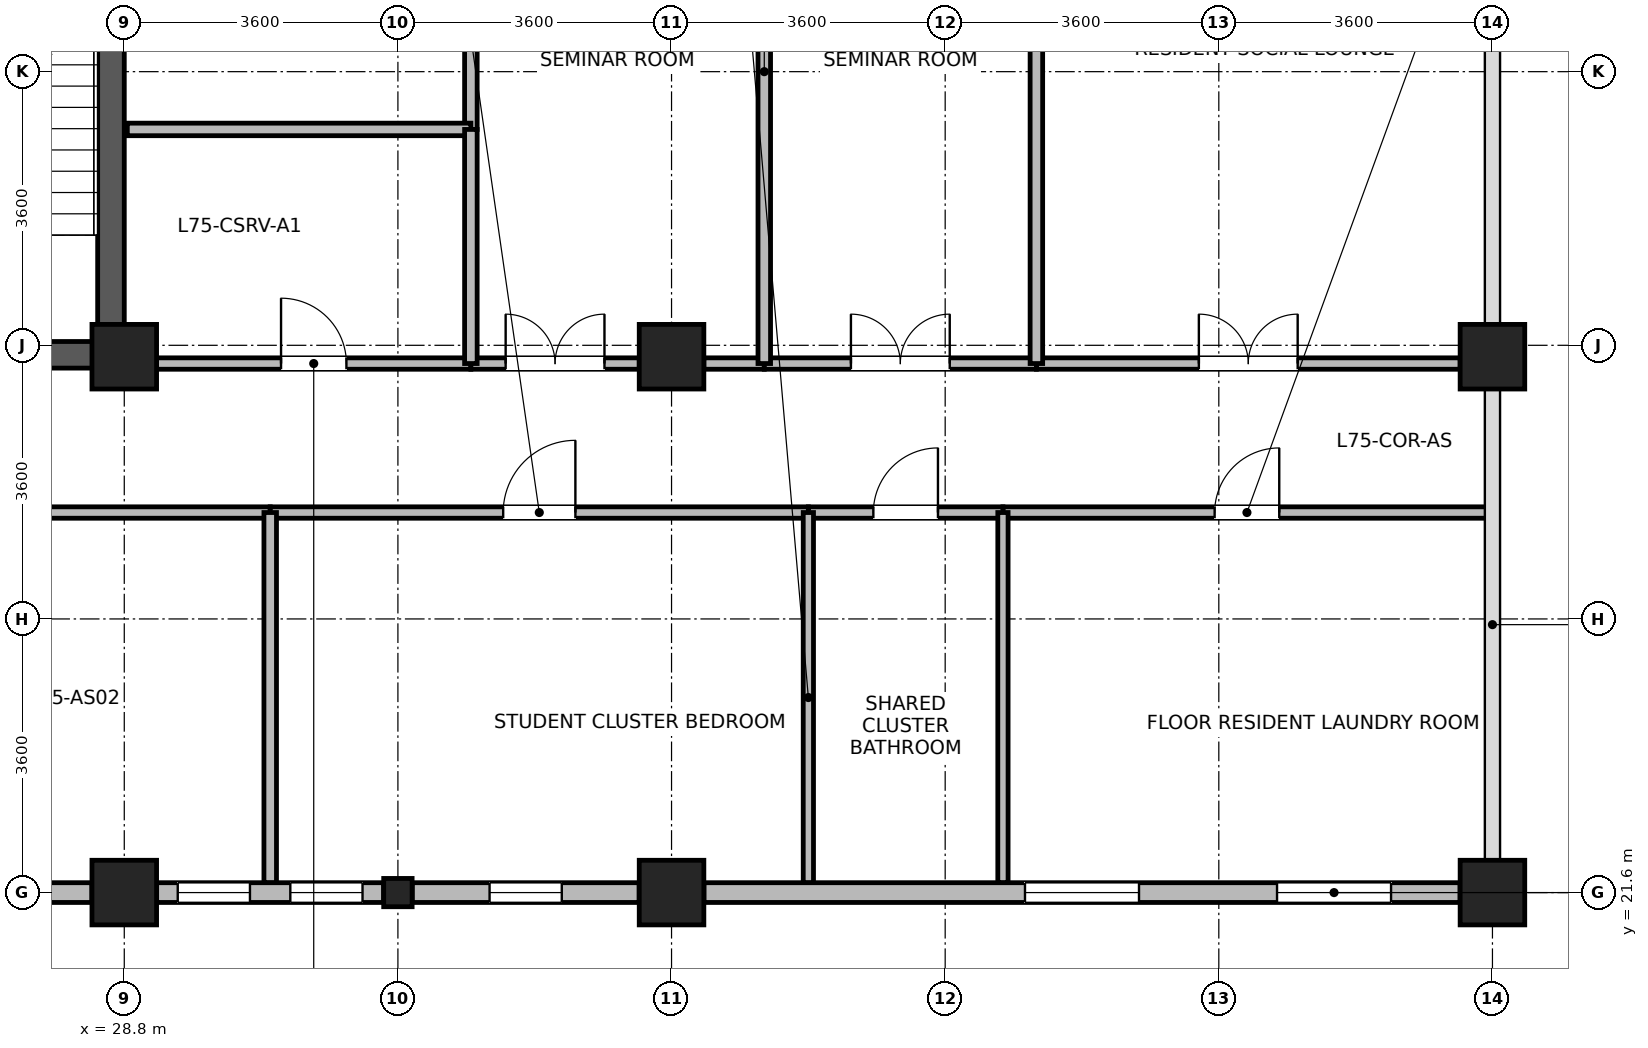
"""IFC4 building model, lengths in metres.
Left out: names, types, materials, properties, quantities, classifications, styles, units other than length and angle.
Written with IfcOpenShell. Run it as: python <this file> out.ifc"""

import sys

from ifc_helpers import new_model, si_unit, direction, frame, frame_2d, origin, origin_2d, place, context, subcontext, project, spatial, rectangle, i_section, extrude, source, transform, mapped, element, fill, save


model = new_model("IFC4")
c1 = context("Model", 3, precision=1e-05, world=origin(), true_north=direction((0.0, 1.0)))
c2 = subcontext(c1, "Body", "Model", "MODEL_VIEW")
j1 = project(units=[si_unit("LENGTHUNIT", "METRE"), si_unit("PLANEANGLEUNIT", "RADIAN")], contexts=[c1])
p1 = place(None, origin())
s1 = spatial("IfcSite", under=j1, at=p1, CompositionType="ELEMENT")
p2 = place(p1, origin())
s2 = spatial("IfcBuilding", under=s1, at=p2, CompositionType="ELEMENT")
p3 = place(p2, frame((0.0, 0.0, 290.6)))
s3 = spatial("IfcBuildingStorey", under=s2, at=p3, CompositionType="ELEMENT", Elevation=290.6)
p4 = place(p3, frame((28.625, 28.5, 0.0), z_axis=(0.0, 0.0, 1.0), x_axis=(0.0, 1.0, 0.0)))
e1 = element("IfcWall", 1, at=p4, inside=s3, PredefinedType="SHEAR", context=c2, shape_type="SweptSolid", body=[
    extrude(rectangle(XDim=7.7, YDim=0.35, at=frame_2d((3.85, 0.0))), origin(), (0.0, 0.0, 1.0), 3.475),
])
p5 = place(p3, frame((25.25, 28.675, 0.0), z_axis=(0.0, 0.0, 1.0), x_axis=(1.0, 0.0, 0.0)))
e2 = element("IfcWall", 2, at=p5, inside=s3, PredefinedType="SHEAR", context=c2, shape_type="SweptSolid", body=[
    extrude(rectangle(XDim=3.2, YDim=0.35, at=frame_2d((1.6, 0.0))), origin(), (0.0, 0.0, 1.0), 3.475),
])
m1 = source(origin(), c2, "Body", "SweptSolid", [
    extrude(rectangle(XDim=0.85, YDim=0.85, at=origin_2d()), origin(), (0.0, 0.0, 1.0), 3.7),
])
for number, where, z_axis, x_axis in (
    (3, (28.8, 21.6, 0.0), (0.0, 0.0, 1.0), (1.0, 0.0, 0.0)),
    (4, (28.8, 28.65, 0.0), (0.0, 0.0, 1.0), (1.0, 0.0, 0.0)),
    (5, (36.0, 21.6, 0.0), (0.0, 0.0, 1.0), (1.0, 0.0, 0.0)),
    (6, (36.0, 28.65, 0.0), (0.0, 0.0, 1.0), (1.0, 0.0, 0.0)),
    (7, (46.8, 21.6, 0.0), (0.0, 0.0, 1.0), (1.0, 0.0, 0.0)),
    (8, (46.8, 28.65, 0.0), (0.0, 0.0, 1.0), (1.0, 0.0, 0.0)),
):
    element("IfcColumn", number, at=place(p3, frame(where, z_axis=z_axis, x_axis=x_axis)), inside=s3, PredefinedType="COLUMN", context=c2, shape_type="MappedRepresentation", body=[
        mapped(m1, transform((0.0, 0.0, 0.0), x_axis=(1.0, 0.0, 0.0), y_axis=(0.0, 1.0, 0.0), z_axis=(0.0, 0.0, 1.0), scale=1.0)),
    ])
m2 = source(origin(), c2, "Body", "SweptSolid", [
    extrude(i_section(OverallWidth=0.374, OverallDepth=0.372, WebThickness=0.015, FlangeThickness=0.026, FilletRadius=0.015, at=origin_2d()), origin(), (0.0, 0.0, 1.0), 3.7),
])
p6 = place(p3, frame((32.4, 21.6, 0.0), z_axis=(0.0, 0.0, 1.0), x_axis=(1.0, 0.0, 0.0)))
e9 = element("IfcColumn", 9, at=p6, inside=s3, PredefinedType="COLUMN", context=c2, shape_type="MappedRepresentation", body=[
    mapped(m2, transform((0.0, 0.0, 0.0), x_axis=(1.0, 0.0, 0.0), y_axis=(0.0, 1.0, 0.0), z_axis=(0.0, 0.0, 1.0), scale=1.0)),
])
p7 = place(p3, frame((28.374, 21.6, 0.0), z_axis=(0.0, 0.0, 1.0), x_axis=(-1.0, 0.0, 0.0)))
e10 = element("IfcWall", 10, at=p7, inside=s3, PredefinedType="STANDARD", context=c2, shape_type="SweptSolid", body=[
    extrude(rectangle(XDim=2.986, YDim=0.26, at=frame_2d((1.493, 0.0))), origin(), (0.0, 0.0, 1.0), 3.055),
])
p8 = place(p7, frame((1.018, 0.0, 0.85)))
e11 = element("IfcOpeningElement", 11, at=p8, cuts=e10, PredefinedType="OPENING", context=c2, shape_type="SweptSolid", body=[
    extrude(rectangle(XDim=0.95, YDim=1.75, at=frame_2d((0.475, 0.875))), frame((0.0, 0.14, 0.0), z_axis=(0.0, -1.0, 0.0), x_axis=(1.0, 0.0, 0.0)), (0.0, 0.0, 1.0), 0.28),
])
p9 = place(p3, frame((32.212, 21.6, 0.0), z_axis=(0.0, 0.0, 1.0), x_axis=(-1.0, 0.0, 0.0)))
e12 = element("IfcWall", 12, at=p9, inside=s3, PredefinedType="STANDARD", context=c2, shape_type="SweptSolid", body=[
    extrude(rectangle(XDim=2.986, YDim=0.26, at=frame_2d((1.493, 0.0))), origin(), (0.0, 0.0, 1.0), 3.055),
])
p10 = place(p9, frame((0.278, 0.0, 0.85)))
e13 = element("IfcOpeningElement", 13, at=p10, cuts=e12, PredefinedType="OPENING", context=c2, shape_type="SweptSolid", body=[
    extrude(rectangle(XDim=0.95, YDim=1.75, at=frame_2d((0.475, 0.875))), frame((0.0, 0.14, 0.0), z_axis=(0.0, -1.0, 0.0), x_axis=(1.0, 0.0, 0.0)), (0.0, 0.0, 1.0), 0.28),
])
p11 = place(p9, frame((1.759, 0.0, 0.85)))
e14 = element("IfcOpeningElement", 14, at=p11, cuts=e12, PredefinedType="OPENING", context=c2, shape_type="SweptSolid", body=[
    extrude(rectangle(XDim=0.95, YDim=1.75, at=frame_2d((0.475, 0.875))), frame((0.0, 0.14, 0.0), z_axis=(0.0, -1.0, 0.0), x_axis=(1.0, 0.0, 0.0)), (0.0, 0.0, 1.0), 0.28),
])
p12 = place(p3, frame((35.574, 21.6, 0.0), z_axis=(0.0, 0.0, 1.0), x_axis=(-1.0, 0.0, 0.0)))
e15 = element("IfcWall", 15, at=p12, inside=s3, PredefinedType="STANDARD", context=c2, shape_type="SweptSolid", body=[
    extrude(rectangle(XDim=2.986, YDim=0.26, at=frame_2d((1.493, 0.0))), origin(), (0.0, 0.0, 1.0), 3.055),
])
p13 = place(p12, frame((1.018, 0.0, 0.85)))
e16 = element("IfcOpeningElement", 16, at=p13, cuts=e15, PredefinedType="OPENING", context=c2, shape_type="SweptSolid", body=[
    extrude(rectangle(XDim=0.95, YDim=1.75, at=frame_2d((0.475, 0.875))), frame((0.0, 0.14, 0.0), z_axis=(0.0, -1.0, 0.0), x_axis=(1.0, 0.0, 0.0)), (0.0, 0.0, 1.0), 0.28),
])
p14 = place(p3, frame((46.374, 21.6, 0.0), z_axis=(0.0, 0.0, 1.0), x_axis=(-1.0, 0.0, 0.0)))
e17 = element("IfcWall", 17, at=p14, inside=s3, PredefinedType="STANDARD", context=c2, shape_type="SweptSolid", body=[
    extrude(rectangle(XDim=9.948, YDim=0.26, at=frame_2d((4.974, 0.0))), origin(), (0.0, 0.0, 1.0), 3.055),
])
p15 = place(p14, frame((0.908, 0.0, 0.85)))
e18 = element("IfcOpeningElement", 18, at=p15, cuts=e17, PredefinedType="OPENING", context=c2, shape_type="SweptSolid", body=[
    extrude(rectangle(XDim=1.5, YDim=1.85, at=frame_2d((0.75, 0.925))), frame((0.0, 0.14, 0.0), z_axis=(0.0, -1.0, 0.0), x_axis=(1.0, 0.0, 0.0)), (0.0, 0.0, 1.0), 0.28),
])
p16 = place(p14, frame((4.224, 0.0, 0.85)))
e19 = element("IfcOpeningElement", 19, at=p16, cuts=e17, PredefinedType="OPENING", context=c2, shape_type="SweptSolid", body=[
    extrude(rectangle(XDim=1.5, YDim=1.85, at=frame_2d((0.75, 0.925))), frame((0.0, 0.14, 0.0), z_axis=(0.0, -1.0, 0.0), x_axis=(1.0, 0.0, 0.0)), (0.0, 0.0, 1.0), 0.28),
])
p17 = place(p3, frame((17.78, 26.6, 0.0), z_axis=(0.0, 0.0, 1.0), x_axis=(1.0, 0.0, 0.0)))
e20 = element("IfcWall", 20, at=p17, inside=s3, PredefinedType="PARTITIONING", context=c2, shape_type="SweptSolid", body=[
    extrude(rectangle(XDim=12.94, YDim=0.15, at=frame_2d((6.47, 0.0))), origin(), (0.0, 0.0, 1.0), 3.455),
])
p18 = place(p17, frame((6.02, 0.0, 0.0)))
e21 = element("IfcOpeningElement", 21, at=p18, cuts=e20, PredefinedType="OPENING", context=c2, shape_type="SweptSolid", body=[
    extrude(rectangle(XDim=0.9, YDim=2.08, at=frame_2d((0.45, 1.04))), frame((0.0, 0.085, 0.0), z_axis=(0.0, -1.0, 0.0), x_axis=(1.0, 0.0, 0.0)), (0.0, 0.0, 1.0), 0.17),
])
p19 = place(p3, frame((30.72, 26.6, 0.0), z_axis=(0.0, 0.0, 1.0), x_axis=(1.0, 0.0, 0.0)))
e22 = element("IfcWall", 22, at=p19, inside=s3, PredefinedType="PARTITIONING", context=c2, shape_type="SweptSolid", body=[
    extrude(rectangle(XDim=7.08, YDim=0.15, at=frame_2d((3.54, 0.0))), origin(), (0.0, 0.0, 1.0), 3.455),
])
p20 = place(p19, frame((3.065, 0.0, 0.0)))
e23 = element("IfcOpeningElement", 23, at=p20, cuts=e22, PredefinedType="OPENING", context=c2, shape_type="SweptSolid", body=[
    extrude(rectangle(XDim=0.95, YDim=2.1, at=frame_2d((0.475, 1.05))), frame((0.0, 0.085, 0.0), z_axis=(0.0, -1.0, 0.0), x_axis=(1.0, 0.0, 0.0)), (0.0, 0.0, 1.0), 0.17),
])
p21 = place(p3, frame((40.36, 26.6, 0.0), z_axis=(0.0, 0.0, 1.0), x_axis=(1.0, 0.0, 0.0)))
e24 = element("IfcWall", 24, at=p21, inside=s3, PredefinedType="PARTITIONING", context=c2, shape_type="SweptSolid", body=[
    extrude(rectangle(XDim=6.42, YDim=0.15, at=frame_2d((3.21, 0.0))), origin(), (0.0, 0.0, 1.0), 3.455),
])
p22 = place(p21, frame((2.785, 0.0, 0.0)))
e25 = element("IfcOpeningElement", 25, at=p22, cuts=e24, PredefinedType="OPENING", context=c2, shape_type="SweptSolid", body=[
    extrude(rectangle(XDim=0.85, YDim=2.04, at=frame_2d((0.425, 1.02))), frame((0.0, 0.085, 0.0), z_axis=(0.0, -1.0, 0.0), x_axis=(1.0, 0.0, 0.0)), (0.0, 0.0, 1.0), 0.17),
])
p23 = place(p3, frame((40.8, 28.56, 0.0), z_axis=(0.0, 0.0, 1.0), x_axis=(1.0, 0.0, 0.0)))
e26 = element("IfcWall", 26, at=p23, inside=s3, PredefinedType="PARTITIONING", context=c2, shape_type="SweptSolid", body=[
    extrude(rectangle(XDim=5.575, YDim=0.15, at=frame_2d((2.788, 0.0))), origin(), (0.0, 0.0, 1.0), 2.905),
])
p24 = place(p23, frame((2.137, 0.0, 0.0)))
e27 = element("IfcOpeningElement", 27, at=p24, cuts=e26, PredefinedType="OPENING", context=c2, shape_type="SweptSolid", body=[
    extrude(rectangle(XDim=1.3, YDim=2.12, at=frame_2d((0.65, 1.06))), frame((0.0, 0.085, 0.0), z_axis=(0.0, -1.0, 0.0), x_axis=(1.0, 0.0, 0.0)), (0.0, 0.0, 1.0), 0.17),
])
p25 = place(p3, frame((29.225, 28.56, 0.0), z_axis=(0.0, 0.0, 1.0), x_axis=(1.0, 0.0, 0.0)))
e28 = element("IfcWall", 28, at=p25, inside=s3, PredefinedType="PARTITIONING", context=c2, shape_type="SweptSolid", body=[
    extrude(rectangle(XDim=4.135, YDim=0.15, at=frame_2d((2.067, 0.0))), origin(), (0.0, 0.0, 1.0), 2.905),
])
p26 = place(p25, frame((1.637, 0.0, 0.0)))
e29 = element("IfcOpeningElement", 29, at=p26, cuts=e28, PredefinedType="OPENING", context=c2, shape_type="SweptSolid", body=[
    extrude(rectangle(XDim=0.86, YDim=2.02, at=frame_2d((0.43, 1.01))), frame((0.0, 0.085, 0.0), z_axis=(0.0, -1.0, 0.0), x_axis=(1.0, 0.0, 0.0)), (0.0, 0.0, 1.0), 0.17),
])
p27 = place(p3, frame((33.36, 28.56, 0.0), z_axis=(0.0, 0.0, 1.0), x_axis=(1.0, 0.0, 0.0)))
e30 = element("IfcWall", 30, at=p27, inside=s3, PredefinedType="PARTITIONING", context=c2, shape_type="SweptSolid", body=[
    extrude(rectangle(XDim=2.215, YDim=0.15, at=frame_2d((1.107, 0.0))), origin(), (0.0, 0.0, 1.0), 2.905),
])
p28 = place(p27, frame((0.458, 0.0, 0.0)))
e31 = element("IfcOpeningElement", 31, at=p28, cuts=e30, PredefinedType="OPENING", context=c2, shape_type="SweptSolid", body=[
    extrude(rectangle(XDim=1.3, YDim=2.12, at=frame_2d((0.65, 1.06))), frame((0.0, 0.085, 0.0), z_axis=(0.0, -1.0, 0.0), x_axis=(1.0, 0.0, 0.0)), (0.0, 0.0, 1.0), 0.17),
])
p29 = place(p3, frame((36.425, 28.56, 0.0), z_axis=(0.0, 0.0, 1.0), x_axis=(1.0, 0.0, 0.0)))
e32 = element("IfcWall", 32, at=p29, inside=s3, PredefinedType="PARTITIONING", context=c2, shape_type="SweptSolid", body=[
    extrude(rectangle(XDim=0.795, YDim=0.15, at=frame_2d((0.397, 0.0))), origin(), (0.0, 0.0, 1.0), 2.905),
])
p30 = place(p3, frame((37.22, 28.56, 0.0), z_axis=(0.0, 0.0, 1.0), x_axis=(1.0, 0.0, 0.0)))
e33 = element("IfcWall", 33, at=p30, inside=s3, PredefinedType="PARTITIONING", context=c2, shape_type="SweptSolid", body=[
    extrude(rectangle(XDim=3.58, YDim=0.15, at=frame_2d((1.79, 0.0))), origin(), (0.0, 0.0, 1.0), 2.905),
])
p31 = place(p30, frame((1.14, 0.0, 0.0)))
e34 = element("IfcOpeningElement", 34, at=p31, cuts=e33, PredefinedType="OPENING", context=c2, shape_type="SweptSolid", body=[
    extrude(rectangle(XDim=1.3, YDim=2.12, at=frame_2d((0.65, 1.06))), frame((0.0, 0.085, 0.0), z_axis=(0.0, -1.0, 0.0), x_axis=(1.0, 0.0, 0.0)), (0.0, 0.0, 1.0), 0.17),
])
p32 = place(p3, frame((37.8, 26.6, 0.0), z_axis=(0.0, 0.0, 1.0), x_axis=(1.0, 0.0, 0.0)))
e35 = element("IfcWall", 35, at=p32, inside=s3, PredefinedType="PARTITIONING", context=c2, shape_type="SweptSolid", body=[
    extrude(rectangle(XDim=2.56, YDim=0.15, at=frame_2d((1.28, 0.0))), origin(), (0.0, 0.0, 1.0), 3.455),
])
p33 = place(p32, frame((0.855, 0.0, 0.0)))
e36 = element("IfcOpeningElement", 36, at=p33, cuts=e35, PredefinedType="OPENING", context=c2, shape_type="SweptSolid", body=[
    extrude(rectangle(XDim=0.85, YDim=2.04, at=frame_2d((0.425, 1.02))), frame((0.0, 0.085, 0.0), z_axis=(0.0, -1.0, 0.0), x_axis=(1.0, 0.0, 0.0)), (0.0, 0.0, 1.0), 0.17),
])
for number, where, z_axis, x_axis in (
    (37, (37.22, 28.56, 0.0), (0.0, 0.0, 1.0), (0.0, 1.0, 0.0)),
    (38, (40.8, 28.56, 0.0), (0.0, 0.0, 1.0), (0.0, 1.0, 0.0)),
):
    element("IfcWall", number, at=place(p3, frame(where, z_axis=z_axis, x_axis=x_axis)), inside=s3, PredefinedType="PARTITIONING", context=c2, shape_type="SweptSolid", body=[
        extrude(rectangle(XDim=7.68, YDim=0.165, at=frame_2d((3.84, 0.0))), origin(), (0.0, 0.0, 1.0), 3.455),
    ])
p34 = place(p3, frame((30.72, 21.732, 0.0), z_axis=(0.0, 0.0, 1.0), x_axis=(0.0, 1.0, 0.0)))
e39 = element("IfcWall", 39, at=p34, inside=s3, PredefinedType="PARTITIONING", context=c2, shape_type="SweptSolid", body=[
    extrude(rectangle(XDim=4.868, YDim=0.165, at=frame_2d((2.434, 0.0))), origin(), (0.0, 0.0, 1.0), 3.455),
])
for number, where, z_axis, x_axis in (
    (40, (37.8, 21.732, 0.0), (0.0, 0.0, 1.0), (0.0, 1.0, 0.0)),
    (41, (40.36, 21.732, 0.0), (0.0, 0.0, 1.0), (0.0, 1.0, 0.0)),
):
    element("IfcWall", number, at=place(p3, frame(where, z_axis=z_axis, x_axis=x_axis)), inside=s3, PredefinedType="PARTITIONING", context=c2, shape_type="SweptSolid", body=[
        extrude(rectangle(XDim=4.868, YDim=0.135, at=frame_2d((2.434, 0.0))), origin(), (0.0, 0.0, 1.0), 3.455),
    ])
p35 = place(p3, frame((33.36, 31.64, 0.0), z_axis=(0.0, 0.0, 1.0), x_axis=(0.0, 1.0, 0.0)))
e42 = element("IfcWall", 42, at=p35, inside=s3, PredefinedType="PARTITIONING", context=c2, shape_type="SweptSolid", body=[
    extrude(rectangle(XDim=4.6, YDim=0.165, at=frame_2d((2.3, 0.0))), origin(), (0.0, 0.0, 1.0), 3.455),
])
p36 = place(p3, frame((28.84, 31.64, 0.0), z_axis=(0.0, 0.0, 1.0), x_axis=(1.0, 0.0, 0.0)))
e43 = element("IfcWall", 43, at=p36, inside=s3, PredefinedType="PARTITIONING", context=c2, shape_type="SweptSolid", body=[
    extrude(rectangle(XDim=4.52, YDim=0.165, at=frame_2d((2.26, 0.0))), origin(), (0.0, 0.0, 1.0), 3.455),
])
p37 = place(p3, frame((33.36, 28.56, 0.0), z_axis=(0.0, 0.0, 1.0), x_axis=(0.0, 1.0, 0.0)))
e44 = element("IfcWall", 44, at=p37, inside=s3, PredefinedType="PARTITIONING", context=c2, shape_type="SweptSolid", body=[
    extrude(rectangle(XDim=3.08, YDim=0.165, at=frame_2d((1.54, 0.0))), origin(), (0.0, 0.0, 1.0), 3.455),
])
p38 = place(p10, origin())
e45 = element("IfcWindow", 45, at=p38, inside=s3, PartitioningType="SINGLE_PANEL", PredefinedType="WINDOW", context=c2, shape_type="SweptSolid", body=[
    extrude(rectangle(XDim=0.95, YDim=1.75, at=frame_2d((0.475, 0.875))), frame((0.0, 0.03, 0.0), z_axis=(0.0, -1.0, 0.0), x_axis=(1.0, 0.0, 0.0)), (0.0, 0.0, 1.0), 0.06),
])
fill(e13, e45)
p39 = place(p11, origin())
e46 = element("IfcWindow", 46, at=p39, inside=s3, PartitioningType="SINGLE_PANEL", PredefinedType="WINDOW", context=c2, shape_type="SweptSolid", body=[
    extrude(rectangle(XDim=0.95, YDim=1.75, at=frame_2d((0.475, 0.875))), frame((0.0, 0.03, 0.0), z_axis=(0.0, -1.0, 0.0), x_axis=(1.0, 0.0, 0.0)), (0.0, 0.0, 1.0), 0.06),
])
fill(e14, e46)
p40 = place(p13, origin())
e47 = element("IfcWindow", 47, at=p40, inside=s3, PartitioningType="SINGLE_PANEL", PredefinedType="WINDOW", context=c2, shape_type="SweptSolid", body=[
    extrude(rectangle(XDim=0.95, YDim=1.75, at=frame_2d((0.475, 0.875))), frame((0.0, 0.03, 0.0), z_axis=(0.0, -1.0, 0.0), x_axis=(1.0, 0.0, 0.0)), (0.0, 0.0, 1.0), 0.06),
])
fill(e16, e47)
p41 = place(p15, origin())
e48 = element("IfcWindow", 48, at=p41, inside=s3, PartitioningType="SINGLE_PANEL", PredefinedType="WINDOW", context=c2, shape_type="SweptSolid", body=[
    extrude(rectangle(XDim=1.5, YDim=1.85, at=frame_2d((0.75, 0.925))), frame((0.0, 0.03, 0.0), z_axis=(0.0, -1.0, 0.0), x_axis=(1.0, 0.0, 0.0)), (0.0, 0.0, 1.0), 0.06),
])
fill(e18, e48)
p42 = place(p16, origin())
e49 = element("IfcWindow", 49, at=p42, inside=s3, PartitioningType="SINGLE_PANEL", PredefinedType="WINDOW", context=c2, shape_type="SweptSolid", body=[
    extrude(rectangle(XDim=1.5, YDim=1.85, at=frame_2d((0.75, 0.925))), frame((0.0, 0.03, 0.0), z_axis=(0.0, -1.0, 0.0), x_axis=(1.0, 0.0, 0.0)), (0.0, 0.0, 1.0), 0.06),
])
fill(e19, e49)
p43 = place(p20, origin())
e50 = element("IfcDoor", 50, at=p43, inside=s3, OperationType="SINGLE_SWING_RIGHT", PredefinedType="DOOR", context=c2, shape_type="SweptSolid", body=[
    extrude(rectangle(XDim=0.95, YDim=2.1, at=frame_2d((0.475, 1.05))), frame((0.0, 0.025, 0.0), z_axis=(0.0, -1.0, 0.0), x_axis=(1.0, 0.0, 0.0)), (0.0, 0.0, 1.0), 0.05),
])
fill(e23, e50)
p44 = place(p22, origin())
e51 = element("IfcDoor", 51, at=p44, inside=s3, OperationType="SINGLE_SWING_RIGHT", PredefinedType="DOOR", context=c2, shape_type="SweptSolid", body=[
    extrude(rectangle(XDim=0.85, YDim=2.04, at=frame_2d((0.425, 1.02))), frame((0.0, 0.025, 0.0), z_axis=(0.0, -1.0, 0.0), x_axis=(1.0, 0.0, 0.0)), (0.0, 0.0, 1.0), 0.05),
])
fill(e25, e51)
p45 = place(p24, origin())
e52 = element("IfcDoor", 52, at=p45, inside=s3, OperationType="DOUBLE_DOOR_SINGLE_SWING", PredefinedType="DOOR", context=c2, shape_type="SweptSolid", body=[
    extrude(rectangle(XDim=1.3, YDim=2.12, at=frame_2d((0.65, 1.06))), frame((0.0, 0.025, 0.0), z_axis=(0.0, -1.0, 0.0), x_axis=(1.0, 0.0, 0.0)), (0.0, 0.0, 1.0), 0.05),
])
fill(e27, e52)
p46 = place(p26, origin())
e53 = element("IfcDoor", 53, at=p46, inside=s3, OperationType="SINGLE_SWING_LEFT", PredefinedType="DOOR", context=c2, shape_type="SweptSolid", body=[
    extrude(rectangle(XDim=0.86, YDim=2.02, at=frame_2d((0.43, 1.01))), frame((0.0, 0.025, 0.0), z_axis=(0.0, -1.0, 0.0), x_axis=(1.0, 0.0, 0.0)), (0.0, 0.0, 1.0), 0.05),
])
fill(e29, e53)
p47 = place(p28, origin())
e54 = element("IfcDoor", 54, at=p47, inside=s3, OperationType="DOUBLE_DOOR_SINGLE_SWING", PredefinedType="DOOR", context=c2, shape_type="SweptSolid", body=[
    extrude(rectangle(XDim=1.3, YDim=2.12, at=frame_2d((0.65, 1.06))), frame((0.0, 0.025, 0.0), z_axis=(0.0, -1.0, 0.0), x_axis=(1.0, 0.0, 0.0)), (0.0, 0.0, 1.0), 0.05),
])
fill(e31, e54)
p48 = place(p31, origin())
e55 = element("IfcDoor", 55, at=p48, inside=s3, OperationType="DOUBLE_DOOR_SINGLE_SWING", PredefinedType="DOOR", context=c2, shape_type="SweptSolid", body=[
    extrude(rectangle(XDim=1.3, YDim=2.12, at=frame_2d((0.65, 1.06))), frame((0.0, 0.025, 0.0), z_axis=(0.0, -1.0, 0.0), x_axis=(1.0, 0.0, 0.0)), (0.0, 0.0, 1.0), 0.05),
])
fill(e34, e55)
p49 = place(p33, origin())
e56 = element("IfcDoor", 56, at=p49, inside=s3, OperationType="SINGLE_SWING_RIGHT", PredefinedType="DOOR", context=c2, shape_type="SweptSolid", body=[
    extrude(rectangle(XDim=0.85, YDim=2.04, at=frame_2d((0.425, 1.02))), frame((0.0, 0.025, 0.0), z_axis=(0.0, -1.0, 0.0), x_axis=(1.0, 0.0, 0.0)), (0.0, 0.0, 1.0), 0.05),
])
fill(e36, e56)
save(model, sys.argv[1])
